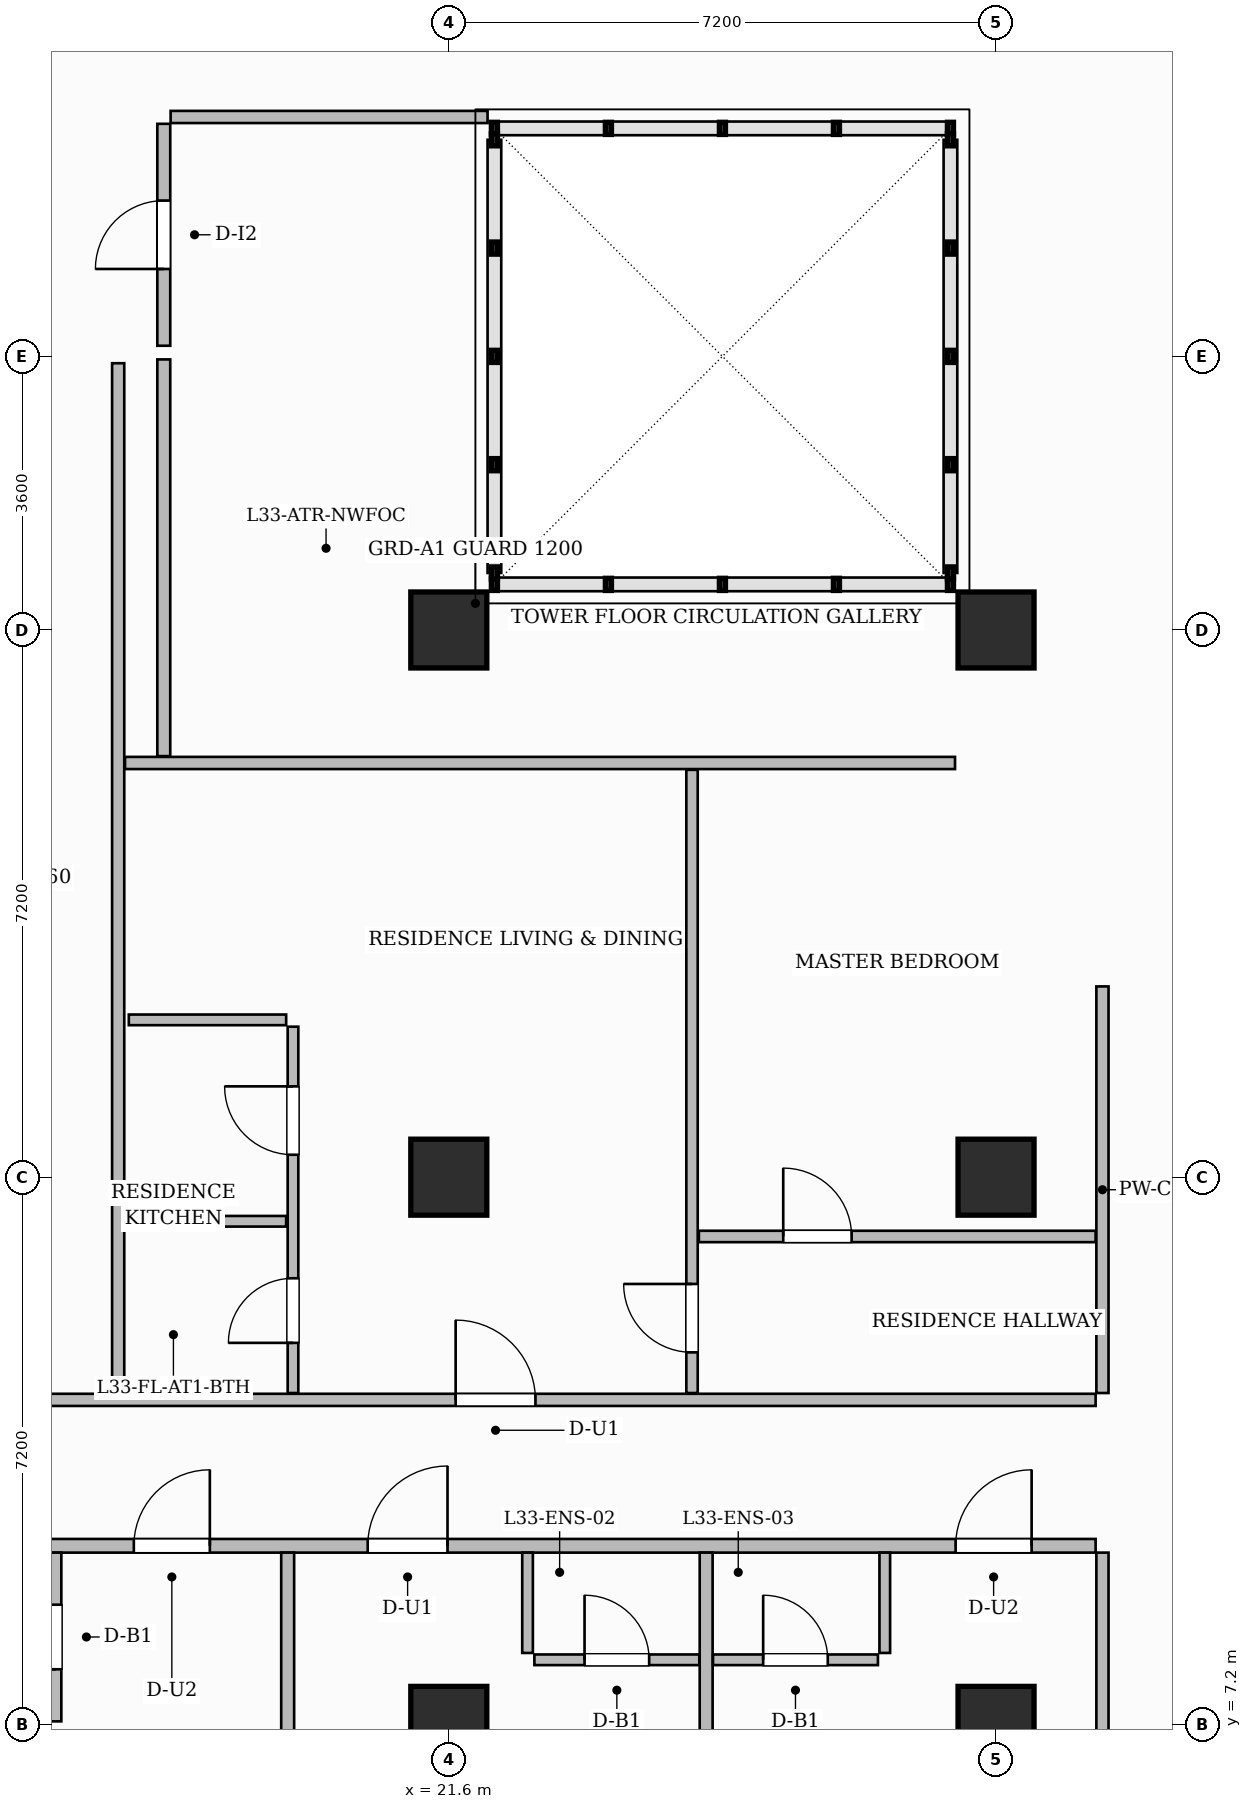
"""IFC4 building model, lengths in metres.
Left out: names, types, materials, properties, quantities, classifications, styles, units other than length and angle.
Written with IfcOpenShell. Run it as: python <this file> out.ifc"""

import sys

from ifc_helpers import new_model, si_unit, direction, frame, frame_2d, origin, origin_2d, place, context, subcontext, project, spatial, rectangle, extrude, source, transform, mapped, element, fill, save


model = new_model("IFC4")
c1 = context("Model", 3, precision=1e-05, world=origin(), true_north=direction((0.0, 1.0)))
c2 = subcontext(c1, "Body", "Model", "MODEL_VIEW")
j1 = project(units=[si_unit("LENGTHUNIT", "METRE"), si_unit("PLANEANGLEUNIT", "RADIAN")], contexts=[c1])
p1 = place(None, origin())
s1 = spatial("IfcSite", under=j1, at=p1, CompositionType="ELEMENT")
p2 = place(p1, origin())
s2 = spatial("IfcBuilding", under=s1, at=p2, CompositionType="ELEMENT")
p3 = place(p2, frame((0.0, 0.0, 134.0)))
s3 = spatial("IfcBuildingStorey", under=s2, at=p3, CompositionType="ELEMENT", Elevation=134.0)
m1 = source(origin(), c2, "Body", "SweptSolid", [
    extrude(rectangle(XDim=1.0, YDim=1.0, at=origin_2d()), origin(), (0.0, 0.0, 1.0), 3.7),
])
for number, where, z_axis, x_axis in (
    (1, (21.6, 7.2, 0.0), (0.0, 0.0, 1.0), (1.0, 0.0, 0.0)),
    (2, (21.6, 14.4, 0.0), (0.0, 0.0, 1.0), (1.0, 0.0, 0.0)),
    (3, (21.6, 21.6, 0.0), (0.0, 0.0, 1.0), (1.0, 0.0, 0.0)),
    (4, (28.8, 7.2, 0.0), (0.0, 0.0, 1.0), (1.0, 0.0, 0.0)),
    (5, (28.8, 14.4, 0.0), (0.0, 0.0, 1.0), (1.0, 0.0, 0.0)),
    (6, (28.8, 21.6, 0.0), (0.0, 0.0, 1.0), (1.0, 0.0, 0.0)),
):
    element("IfcColumn", number, at=place(p3, frame(where, z_axis=z_axis, x_axis=x_axis)), inside=s3, PredefinedType="COLUMN", context=c2, shape_type="MappedRepresentation", body=[
        mapped(m1, transform((0.0, 0.0, 0.0), scale=1.0)),
    ])
p4 = place(p3, frame((14.548, 9.55, 0.0), z_axis=(0.0, 0.0, 1.0), x_axis=(1.0, 0.0, 0.0)))
e7 = element("IfcWall", 7, at=p4, inside=s3, PredefinedType="PARTITIONING", context=c2, shape_type="SweptSolid", body=[
    extrude(rectangle(XDim=15.562, YDim=0.18, at=frame_2d((7.781, 0.0))), origin(), (0.0, 0.0, 1.0), 3.45),
])
p5 = place(p4, frame((2.908, 0.0, 0.0)))
e8 = element("IfcOpeningElement", 8, at=p5, cuts=e7, PredefinedType="OPENING", context=c2, shape_type="SweptSolid", body=[
    extrude(rectangle(XDim=1.0, YDim=2.2, at=frame_2d((0.5, 1.1))), frame((0.0, 0.1, 0.0), z_axis=(0.0, -1.0, 0.0), x_axis=(1.0, 0.0, 0.0)), (0.0, 0.0, 1.0), 0.2),
])
p6 = place(p4, frame((5.985, 0.0, 0.0)))
e9 = element("IfcOpeningElement", 9, at=p6, cuts=e7, PredefinedType="OPENING", context=c2, shape_type="SweptSolid", body=[
    extrude(rectangle(XDim=1.05, YDim=2.25, at=frame_2d((0.525, 1.125))), frame((0.0, 0.1, 0.0), z_axis=(0.0, -1.0, 0.0), x_axis=(1.0, 0.0, 0.0)), (0.0, 0.0, 1.0), 0.2),
])
p7 = place(p4, frame((13.72, 0.0, 0.0)))
e10 = element("IfcOpeningElement", 10, at=p7, cuts=e7, PredefinedType="OPENING", context=c2, shape_type="SweptSolid", body=[
    extrude(rectangle(XDim=1.0, YDim=2.2, at=frame_2d((0.5, 1.1))), frame((0.0, 0.1, 0.0), z_axis=(0.0, -1.0, 0.0), x_axis=(1.0, 0.0, 0.0)), (0.0, 0.0, 1.0), 0.2),
])
p8 = place(p3, frame((14.548, 11.47, 0.0), z_axis=(0.0, 0.0, 1.0), x_axis=(1.0, 0.0, 0.0)))
e11 = element("IfcWall", 11, at=p8, inside=s3, PredefinedType="PARTITIONING", context=c2, shape_type="SweptSolid", body=[
    extrude(rectangle(XDim=15.562, YDim=0.16, at=frame_2d((7.781, 0.0))), origin(), (0.0, 0.0, 1.0), 3.45),
])
p9 = place(p8, frame((7.142, 0.0, 0.0)))
e12 = element("IfcOpeningElement", 12, at=p9, cuts=e11, PredefinedType="OPENING", context=c2, shape_type="SweptSolid", body=[
    extrude(rectangle(XDim=1.05, YDim=2.25, at=frame_2d((0.525, 1.125))), frame((0.0, 0.09, 0.0), z_axis=(0.0, -1.0, 0.0), x_axis=(1.0, 0.0, 0.0)), (0.0, 0.0, 1.0), 0.18),
])
p10 = place(p3, frame((30.2, 11.56, 0.0), z_axis=(0.0, 0.0, 1.0), x_axis=(0.0, 1.0, 0.0)))
e13 = element("IfcWall", 13, at=p10, inside=s3, PredefinedType="PARTITIONING", context=c2, shape_type="SweptSolid", body=[
    extrude(rectangle(XDim=5.35, YDim=0.16, at=frame_2d((2.675, 0.0))), origin(), (0.0, 0.0, 1.0), 3.45),
])
p11 = place(p3, frame((30.2, 0.148, 0.0), z_axis=(0.0, 0.0, 1.0), x_axis=(0.0, 1.0, 0.0)))
e14 = element("IfcWall", 14, at=p11, inside=s3, PredefinedType="PARTITIONING", context=c2, shape_type="SweptSolid", body=[
    extrude(rectangle(XDim=9.312, YDim=0.16, at=frame_2d((4.656, 0.0))), origin(), (0.0, 0.0, 1.0), 3.45),
])
p12 = place(p11, frame((1.977, 0.0, 0.0)))
e15 = element("IfcOpeningElement", 15, at=p12, cuts=e14, PredefinedType="OPENING", context=c2, shape_type="SweptSolid", body=[
    extrude(rectangle(XDim=1.05, YDim=2.15, at=frame_2d((0.525, 1.075))), frame((0.0, 0.09, 0.0), z_axis=(0.0, -1.0, 0.0), x_axis=(1.0, 0.0, 0.0)), (0.0, 0.0, 1.0), 0.18),
])
p13 = place(p3, frame((19.48, 0.148, 0.0), z_axis=(0.0, 0.0, 1.0), x_axis=(0.0, 1.0, 0.0)))
e16 = element("IfcWall", 16, at=p13, inside=s3, PredefinedType="PARTITIONING", context=c2, shape_type="SweptSolid", body=[
    extrude(rectangle(XDim=9.312, YDim=0.17, at=frame_2d((4.656, 0.0))), origin(), (0.0, 0.0, 1.0), 3.45),
])
p14 = place(p3, frame((24.986, 0.148, 0.0), z_axis=(0.0, 0.0, 1.0), x_axis=(0.0, 1.0, 0.0)))
e17 = element("IfcWall", 17, at=p14, inside=s3, PredefinedType="PARTITIONING", context=c2, shape_type="SweptSolid", body=[
    extrude(rectangle(XDim=9.312, YDim=0.17, at=frame_2d((4.656, 0.0))), origin(), (0.0, 0.0, 1.0), 3.105),
])
p15 = place(p3, frame((16.432, 7.24, 0.0), z_axis=(0.0, 0.0, 1.0), x_axis=(0.0, 1.0, 0.0)))
e18 = element("IfcWall", 18, at=p15, inside=s3, PredefinedType="PARTITIONING", context=c2, shape_type="SweptSolid", body=[
    extrude(rectangle(XDim=2.22, YDim=0.14, at=frame_2d((1.11, 0.0))), origin(), (0.0, 0.0, 1.0), 3.45),
])
p16 = place(p15, frame((0.685, 0.0, 0.0)))
e19 = element("IfcOpeningElement", 19, at=p16, cuts=e18, PredefinedType="OPENING", context=c2, shape_type="SweptSolid", body=[
    extrude(rectangle(XDim=0.85, YDim=2.1, at=frame_2d((0.425, 1.05))), frame((0.0, 0.08, 0.0), z_axis=(0.0, -1.0, 0.0), x_axis=(1.0, 0.0, 0.0)), (0.0, 0.0, 1.0), 0.16),
])
p17 = place(p3, frame((22.636, 8.14, 0.0), z_axis=(0.0, 0.0, 1.0), x_axis=(0.0, 1.0, 0.0)))
e20 = element("IfcWall", 20, at=p17, inside=s3, PredefinedType="PARTITIONING", context=c2, shape_type="SweptSolid", body=[
    extrude(rectangle(XDim=1.32, YDim=0.14, at=frame_2d((0.66, 0.0))), origin(), (0.0, 0.0, 1.0), 3.45),
])
p18 = place(p3, frame((22.726, 8.05, 0.0), z_axis=(0.0, 0.0, 1.0), x_axis=(1.0, 0.0, 0.0)))
e21 = element("IfcWall", 21, at=p18, inside=s3, PredefinedType="PARTITIONING", context=c2, shape_type="SweptSolid", body=[
    extrude(rectangle(XDim=2.17, YDim=0.14, at=frame_2d((1.085, 0.0))), origin(), (0.0, 0.0, 1.0), 3.45),
])
p19 = place(p18, frame((0.66, 0.0, 0.0)))
e22 = element("IfcOpeningElement", 22, at=p19, cuts=e21, PredefinedType="OPENING", context=c2, shape_type="SweptSolid", body=[
    extrude(rectangle(XDim=0.85, YDim=2.1, at=frame_2d((0.425, 1.05))), frame((0.0, 0.08, 0.0), z_axis=(0.0, -1.0, 0.0), x_axis=(1.0, 0.0, 0.0)), (0.0, 0.0, 1.0), 0.16),
])
p20 = place(p3, frame((27.336, 8.14, 0.0), z_axis=(0.0, 0.0, 1.0), x_axis=(0.0, 1.0, 0.0)))
e23 = element("IfcWall", 23, at=p20, inside=s3, PredefinedType="PARTITIONING", context=c2, shape_type="SweptSolid", body=[
    extrude(rectangle(XDim=1.32, YDim=0.14, at=frame_2d((0.66, 0.0))), origin(), (0.0, 0.0, 1.0), 3.45),
])
p21 = place(p3, frame((25.076, 8.05, 0.0), z_axis=(0.0, 0.0, 1.0), x_axis=(1.0, 0.0, 0.0)))
e24 = element("IfcWall", 24, at=p21, inside=s3, PredefinedType="PARTITIONING", context=c2, shape_type="SweptSolid", body=[
    extrude(rectangle(XDim=2.17, YDim=0.14, at=frame_2d((1.085, 0.0))), origin(), (0.0, 0.0, 1.0), 3.45),
])
p22 = place(p21, frame((0.66, 0.0, 0.0)))
e25 = element("IfcOpeningElement", 25, at=p22, cuts=e24, PredefinedType="OPENING", context=c2, shape_type="SweptSolid", body=[
    extrude(rectangle(XDim=0.85, YDim=2.1, at=frame_2d((0.425, 1.05))), frame((0.0, 0.08, 0.0), z_axis=(0.0, -1.0, 0.0), x_axis=(1.0, 0.0, 0.0)), (0.0, 0.0, 1.0), 0.16),
])
p23 = place(p3, frame((17.25, 11.56, 0.0), z_axis=(0.0, 0.0, 1.0), x_axis=(0.0, 1.0, 0.0)))
e26 = element("IfcWall", 26, at=p23, inside=s3, PredefinedType="PARTITIONING", context=c2, shape_type="SweptSolid", body=[
    extrude(rectangle(XDim=13.55, YDim=0.16, at=frame_2d((6.775, 0.0))), origin(), (0.0, 0.0, 1.0), 3.45),
])
p24 = place(p3, frame((17.85, 19.94, 0.0), z_axis=(0.0, 0.0, 1.0), x_axis=(0.0, 1.0, 0.0)))
e27 = element("IfcWall", 27, at=p24, inside=s3, PredefinedType="PARTITIONING", context=c2, shape_type="SweptSolid", body=[
    extrude(rectangle(XDim=5.22, YDim=0.17, at=frame_2d((2.61, 0.0))), origin(), (0.0, 0.0, 1.0), 3.105),
])
p25 = place(p3, frame((17.94, 28.35, 0.0), z_axis=(0.0, 0.0, 1.0), x_axis=(1.0, 0.0, 0.0)))
e28 = element("IfcWall", 28, at=p25, inside=s3, PredefinedType="PARTITIONING", context=c2, shape_type="SweptSolid", body=[
    extrude(rectangle(XDim=4.17, YDim=0.16, at=frame_2d((2.085, 0.0))), origin(), (0.0, 0.0, 1.0), 3.45),
])
p26 = place(p3, frame((17.85, 25.34, 0.0), z_axis=(0.0, 0.0, 1.0), x_axis=(0.0, 1.0, 0.0)))
e29 = element("IfcWall", 29, at=p26, inside=s3, PredefinedType="PARTITIONING", context=c2, shape_type="SweptSolid", body=[
    extrude(rectangle(XDim=2.92, YDim=0.17, at=frame_2d((1.46, 0.0))), origin(), (0.0, 0.0, 1.0), 3.45),
])
p27 = place(p26, frame((1.01, 0.0, 0.0)))
e30 = element("IfcOpeningElement", 30, at=p27, cuts=e29, PredefinedType="OPENING", context=c2, shape_type="SweptSolid", body=[
    extrude(rectangle(XDim=0.9, YDim=2.15, at=frame_2d((0.45, 1.075))), frame((0.0, 0.095, 0.0), z_axis=(0.0, -1.0, 0.0), x_axis=(1.0, 0.0, 0.0)), (0.0, 0.0, 1.0), 0.19),
])
p28 = place(p3, frame((17.34, 19.85, 0.0), z_axis=(0.0, 0.0, 1.0), x_axis=(1.0, 0.0, 0.0)))
e31 = element("IfcWall", 31, at=p28, inside=s3, PredefinedType="PARTITIONING", context=c2, shape_type="SweptSolid", body=[
    extrude(rectangle(XDim=10.92, YDim=0.16, at=frame_2d((5.46, 0.0))), origin(), (0.0, 0.0, 1.0), 3.45),
])
p29 = place(p3, frame((19.55, 11.56, 0.0), z_axis=(0.0, 0.0, 1.0), x_axis=(0.0, 1.0, 0.0)))
e32 = element("IfcWall", 32, at=p29, inside=s3, PredefinedType="PARTITIONING", context=c2, shape_type="SweptSolid", body=[
    extrude(rectangle(XDim=4.82, YDim=0.14, at=frame_2d((2.41, 0.0))), origin(), (0.0, 0.0, 1.0), 3.45),
])
p30 = place(p29, frame((0.66, 0.0, 0.0)))
e33 = element("IfcOpeningElement", 33, at=p30, cuts=e32, PredefinedType="OPENING", context=c2, shape_type="SweptSolid", body=[
    extrude(rectangle(XDim=0.85, YDim=2.1, at=frame_2d((0.425, 1.05))), frame((0.0, 0.08, 0.0), z_axis=(0.0, -1.0, 0.0), x_axis=(1.0, 0.0, 0.0)), (0.0, 0.0, 1.0), 0.16),
])
p31 = place(p29, frame((3.135, 0.0, 0.0)))
e34 = element("IfcOpeningElement", 34, at=p31, cuts=e32, PredefinedType="OPENING", context=c2, shape_type="SweptSolid", body=[
    extrude(rectangle(XDim=0.9, YDim=2.15, at=frame_2d((0.45, 1.075))), frame((0.0, 0.08, 0.0), z_axis=(0.0, -1.0, 0.0), x_axis=(1.0, 0.0, 0.0)), (0.0, 0.0, 1.0), 0.16),
])
for number, where, z_axis, x_axis in (
    (35, (17.39, 13.82, 0.0), (0.0, 0.0, 1.0), (1.0, 0.0, 0.0)),
    (36, (17.39, 16.47, 0.0), (0.0, 0.0, 1.0), (1.0, 0.0, 0.0)),
):
    element("IfcWall", number, at=place(p3, frame(where, z_axis=z_axis, x_axis=x_axis)), inside=s3, PredefinedType="PARTITIONING", context=c2, shape_type="SweptSolid", body=[
        extrude(rectangle(XDim=2.07, YDim=0.14, at=frame_2d((1.035, 0.0))), origin(), (0.0, 0.0, 1.0), 3.45),
    ])
p32 = place(p3, frame((24.8, 11.56, 0.0), z_axis=(0.0, 0.0, 1.0), x_axis=(0.0, 1.0, 0.0)))
e37 = element("IfcWall", 37, at=p32, inside=s3, PredefinedType="PARTITIONING", context=c2, shape_type="SweptSolid", body=[
    extrude(rectangle(XDim=8.2, YDim=0.15, at=frame_2d((4.1, 0.0))), origin(), (0.0, 0.0, 1.0), 3.45),
])
p33 = place(p32, frame((0.535, 0.0, 0.0)))
e38 = element("IfcOpeningElement", 38, at=p33, cuts=e37, PredefinedType="OPENING", context=c2, shape_type="SweptSolid", body=[
    extrude(rectangle(XDim=0.9, YDim=2.15, at=frame_2d((0.45, 1.075))), frame((0.0, 0.085, 0.0), z_axis=(0.0, -1.0, 0.0), x_axis=(1.0, 0.0, 0.0)), (0.0, 0.0, 1.0), 0.17),
])
p34 = place(p3, frame((24.89, 13.62, 0.0), z_axis=(0.0, 0.0, 1.0), x_axis=(1.0, 0.0, 0.0)))
e39 = element("IfcWall", 39, at=p34, inside=s3, PredefinedType="PARTITIONING", context=c2, shape_type="SweptSolid", body=[
    extrude(rectangle(XDim=5.22, YDim=0.15, at=frame_2d((2.61, 0.0))), origin(), (0.0, 0.0, 1.0), 3.45),
])
p35 = place(p34, frame((1.11, 0.0, 0.0)))
e40 = element("IfcOpeningElement", 40, at=p35, cuts=e39, PredefinedType="OPENING", context=c2, shape_type="SweptSolid", body=[
    extrude(rectangle(XDim=0.9, YDim=2.15, at=frame_2d((0.45, 1.075))), frame((0.0, 0.085, 0.0), z_axis=(0.0, -1.0, 0.0), x_axis=(1.0, 0.0, 0.0)), (0.0, 0.0, 1.0), 0.17),
])
m2 = source(origin(), c2, "Body", "SweptSolid", [
    extrude(rectangle(XDim=0.85, YDim=2.1, at=frame_2d((0.425, 1.05))), frame((0.0, 0.025, 0.0), z_axis=(0.0, -1.0, 0.0), x_axis=(1.0, 0.0, 0.0)), (0.0, 0.0, 1.0), 0.05),
])
p36 = place(p16, origin())
e41 = element("IfcDoor", 41, at=p36, inside=s3, OperationType="SINGLE_SWING_LEFT", PredefinedType="DOOR", context=c2, shape_type="MappedRepresentation", body=[
    mapped(m2, transform((0.0, 0.0, 0.0), scale=1.0)),
])
fill(e19, e41)
m3 = source(origin(), c2, "Body", "SweptSolid", [
    extrude(rectangle(XDim=1.0, YDim=2.2, at=frame_2d((0.5, 1.1))), frame((0.0, 0.025, 0.0), z_axis=(0.0, -1.0, 0.0), x_axis=(1.0, 0.0, 0.0)), (0.0, 0.0, 1.0), 0.05),
])
p37 = place(p5, origin())
e42 = element("IfcDoor", 42, at=p37, inside=s3, OperationType="SINGLE_SWING_RIGHT", PredefinedType="DOOR", context=c2, shape_type="MappedRepresentation", body=[
    mapped(m3, transform((0.0, 0.0, 0.0), scale=1.0)),
])
fill(e8, e42)
p38 = place(p19, origin())
e43 = element("IfcDoor", 43, at=p38, inside=s3, OperationType="SINGLE_SWING_LEFT", PredefinedType="DOOR", context=c2, shape_type="MappedRepresentation", body=[
    mapped(m2, transform((0.0, 0.0, 0.0), scale=1.0)),
])
fill(e22, e43)
m4 = source(origin(), c2, "Body", "SweptSolid", [
    extrude(rectangle(XDim=1.05, YDim=2.25, at=frame_2d((0.525, 1.125))), frame((0.0, 0.025, 0.0), z_axis=(0.0, -1.0, 0.0), x_axis=(1.0, 0.0, 0.0)), (0.0, 0.0, 1.0), 0.05),
])
p39 = place(p6, origin())
e44 = element("IfcDoor", 44, at=p39, inside=s3, OperationType="SINGLE_SWING_RIGHT", PredefinedType="DOOR", context=c2, shape_type="MappedRepresentation", body=[
    mapped(m4, transform((0.0, 0.0, 0.0), scale=1.0)),
])
fill(e9, e44)
p40 = place(p22, origin())
e45 = element("IfcDoor", 45, at=p40, inside=s3, OperationType="SINGLE_SWING_LEFT", PredefinedType="DOOR", context=c2, shape_type="MappedRepresentation", body=[
    mapped(m2, transform((0.0, 0.0, 0.0), scale=1.0)),
])
fill(e25, e45)
p41 = place(p7, origin())
e46 = element("IfcDoor", 46, at=p41, inside=s3, OperationType="SINGLE_SWING_RIGHT", PredefinedType="DOOR", context=c2, shape_type="MappedRepresentation", body=[
    mapped(m3, transform((0.0, 0.0, 0.0), scale=1.0)),
])
fill(e10, e46)
m5 = source(origin(), c2, "Body", "SweptSolid", [
    extrude(rectangle(XDim=0.9, YDim=2.15, at=frame_2d((0.45, 1.075))), frame((0.0, 0.025, 0.0), z_axis=(0.0, -1.0, 0.0), x_axis=(1.0, 0.0, 0.0)), (0.0, 0.0, 1.0), 0.05),
])
p42 = place(p27, origin())
e47 = element("IfcDoor", 47, at=p42, inside=s3, OperationType="SINGLE_SWING_LEFT", PredefinedType="DOOR", context=c2, shape_type="MappedRepresentation", body=[
    mapped(m5, transform((0.0, 0.0, 0.0), scale=1.0)),
])
fill(e30, e47)
p43 = place(p30, origin())
e48 = element("IfcDoor", 48, at=p43, inside=s3, OperationType="SINGLE_SWING_LEFT", PredefinedType="DOOR", context=c2, shape_type="MappedRepresentation", body=[
    mapped(m2, transform((0.0, 0.0, 0.0), scale=1.0)),
])
fill(e33, e48)
p44 = place(p31, origin())
e49 = element("IfcDoor", 49, at=p44, inside=s3, OperationType="SINGLE_SWING_RIGHT", PredefinedType="DOOR", context=c2, shape_type="MappedRepresentation", body=[
    mapped(m5, transform((0.0, 0.0, 0.0), scale=1.0)),
])
fill(e34, e49)
p45 = place(p9, origin())
e50 = element("IfcDoor", 50, at=p45, inside=s3, OperationType="SINGLE_SWING_LEFT", PredefinedType="DOOR", context=c2, shape_type="MappedRepresentation", body=[
    mapped(m4, transform((0.0, 0.0, 0.0), scale=1.0)),
])
fill(e12, e50)
p46 = place(p33, origin())
e51 = element("IfcDoor", 51, at=p46, inside=s3, OperationType="SINGLE_SWING_RIGHT", PredefinedType="DOOR", context=c2, shape_type="MappedRepresentation", body=[
    mapped(m5, transform((0.0, 0.0, 0.0), scale=1.0)),
])
fill(e38, e51)
p47 = place(p35, origin())
e52 = element("IfcDoor", 52, at=p47, inside=s3, OperationType="SINGLE_SWING_LEFT", PredefinedType="DOOR", context=c2, shape_type="MappedRepresentation", body=[
    mapped(m5, transform((0.0, 0.0, 0.0), scale=1.0)),
])
fill(e40, e52)
save(model, sys.argv[1])
